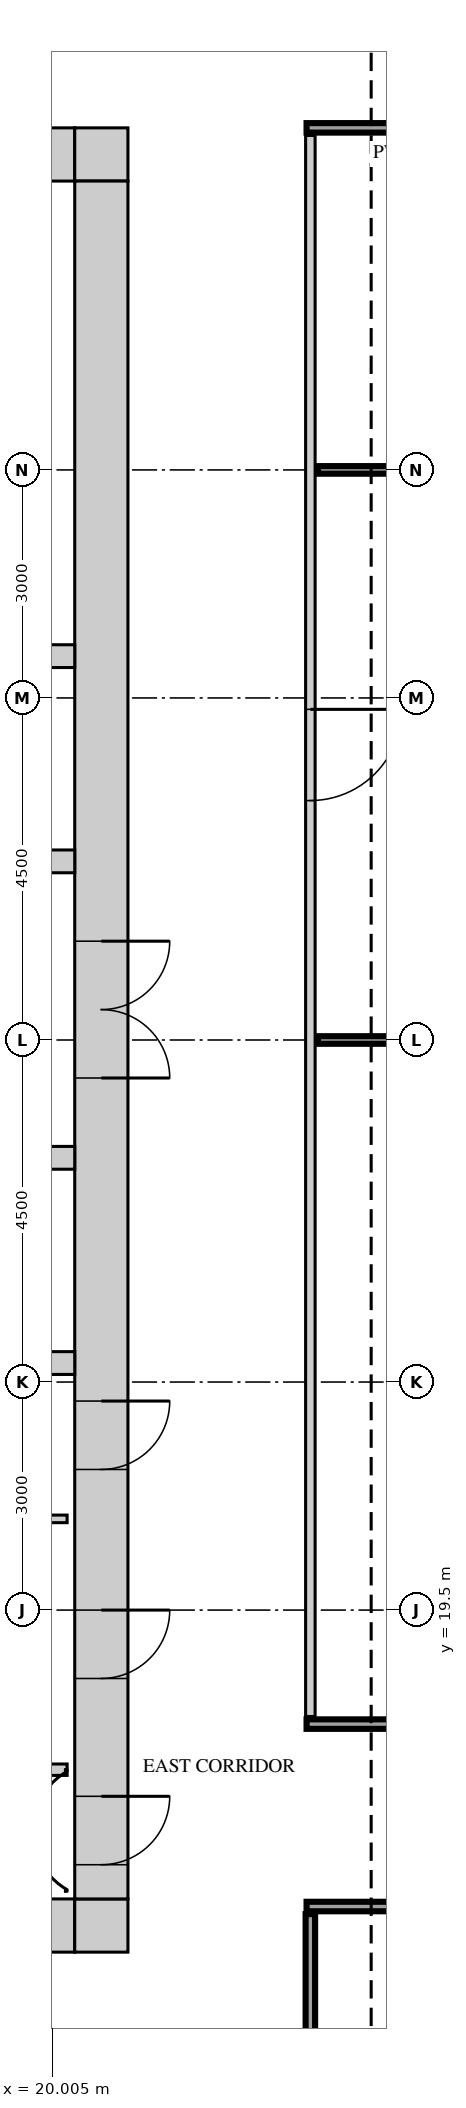
"""IFC4 building model, lengths in metres.
Left out: names, types, materials, properties, quantities, classifications, styles, units other than length and angle.
Written with IfcOpenShell. Run it as: python <this file> out.ifc"""

import sys

from ifc_helpers import new_model, si_unit, direction, frame, frame_2d, origin, place, context, subcontext, project, spatial, rectangle, extrude, source, transform, mapped, element, fill, save


model = new_model("IFC4")
c1 = context("Model", 3, precision=1e-05, world=origin(), true_north=direction((0.0, 1.0)))
c2 = subcontext(c1, "Body", "Model", "MODEL_VIEW")
j1 = project(units=[si_unit("LENGTHUNIT", "METRE"), si_unit("PLANEANGLEUNIT", "RADIAN")], contexts=[c1])
p1 = place(None, origin())
s1 = spatial("IfcSite", under=j1, at=p1, CompositionType="ELEMENT")
p2 = place(p1, origin())
s2 = spatial("IfcBuilding", under=s1, at=p2, CompositionType="ELEMENT")
p3 = place(p2, frame((0.0, 0.0, 254.2)))
s3 = spatial("IfcBuildingStorey", under=s2, at=p3, CompositionType="ELEMENT", Elevation=254.2)
m1 = source(origin(), c2, "Body", "SweptSolid", [
    extrude(rectangle(XDim=13.6, YDim=0.7, at=frame_2d((6.8, 0.0))), origin(), (0.0, 0.0, 1.0), 3.75),
])
p4 = place(p3, frame((6.7, 38.65, 0.0), z_axis=(0.0, 0.0, 1.0), x_axis=(1.0, 0.0, 0.0)))
e1 = element("IfcWall", 1, at=p4, inside=s3, PredefinedType="SHEAR", context=c2, shape_type="MappedRepresentation", body=[
    mapped(m1, transform((0.0, 0.0, 0.0))),
])
m2 = source(origin(), c2, "Body", "SweptSolid", [
    extrude(rectangle(XDim=0.9, YDim=2.1, at=frame_2d((0.45, 1.05))), frame((0.0, 0.36, 0.0), z_axis=(0.0, -1.0, 0.0), x_axis=(1.0, 0.0, 0.0)), (0.0, 0.0, 1.0), 0.72),
])
p5 = place(p4, frame((3.0, 0.0, 0.0)))
e2 = element("IfcOpeningElement", 2, at=p5, cuts=e1, PredefinedType="OPENING", context=c2, shape_type="MappedRepresentation", body=[
    mapped(m2, transform((0.0, 0.0, 0.0))),
])
p6 = place(p4, frame((9.7, 0.0, 0.0)))
e3 = element("IfcOpeningElement", 3, at=p6, cuts=e1, PredefinedType="OPENING", context=c2, shape_type="MappedRepresentation", body=[
    mapped(m2, transform((0.0, 0.0, 0.0))),
])
m3 = source(origin(), c2, "Body", "SweptSolid", [
    extrude(rectangle(XDim=0.7, YDim=0.7, at=frame_2d((0.35, 0.0))), origin(), (0.0, 0.0, 1.0), 3.75),
])
p7 = place(p3, frame((20.3, 38.65, 0.0), z_axis=(0.0, 0.0, 1.0), x_axis=(1.0, 0.0, 0.0)))
e4 = element("IfcWall", 4, at=p7, inside=s3, PredefinedType="SHEAR", context=c2, shape_type="MappedRepresentation", body=[
    mapped(m3, transform((0.0, 0.0, 0.0))),
])
p8 = place(p3, frame((6.7, 15.35, 0.0), z_axis=(0.0, 0.0, 1.0), x_axis=(1.0, 0.0, 0.0)))
e5 = element("IfcWall", 5, at=p8, inside=s3, PredefinedType="SHEAR", context=c2, shape_type="MappedRepresentation", body=[
    mapped(m1, transform((0.0, 0.0, 0.0))),
])
m4 = source(origin(), c2, "Body", "SweptSolid", [
    extrude(rectangle(XDim=1.2, YDim=2.1, at=frame_2d((0.6, 1.05))), frame((0.0, 0.36, 0.0), z_axis=(0.0, -1.0, 0.0), x_axis=(1.0, 0.0, 0.0)), (0.0, 0.0, 1.0), 0.72),
])
p9 = place(p8, frame((5.5, 0.0, 0.0)))
e6 = element("IfcOpeningElement", 6, at=p9, cuts=e5, PredefinedType="OPENING", context=c2, shape_type="MappedRepresentation", body=[
    mapped(m4, transform((0.0, 0.0, 0.0))),
])
p10 = place(p8, frame((2.15, 0.0, 0.0)))
e7 = element("IfcOpeningElement", 7, at=p10, cuts=e5, PredefinedType="OPENING", context=c2, shape_type="MappedRepresentation", body=[
    mapped(m4, transform((0.0, 0.0, 0.0))),
])
m5 = source(origin(), c2, "Body", "SweptSolid", [
    extrude(rectangle(XDim=1.0, YDim=2.1, at=frame_2d((0.5, 1.05))), frame((0.0, 0.36, 0.0), z_axis=(0.0, -1.0, 0.0), x_axis=(1.0, 0.0, 0.0)), (0.0, 0.0, 1.0), 0.72),
])
p11 = place(p8, frame((8.0, 0.0, 0.0)))
e8 = element("IfcOpeningElement", 8, at=p11, cuts=e5, PredefinedType="OPENING", context=c2, shape_type="MappedRepresentation", body=[
    mapped(m5, transform((0.0, 0.0, 0.0))),
])
p12 = place(p3, frame((20.3, 15.35, 0.0), z_axis=(0.0, 0.0, 1.0), x_axis=(1.0, 0.0, 0.0)))
e9 = element("IfcWall", 9, at=p12, inside=s3, PredefinedType="SHEAR", context=c2, shape_type="MappedRepresentation", body=[
    mapped(m3, transform((0.0, 0.0, 0.0))),
])
m6 = source(origin(), c2, "Body", "SweptSolid", [
    extrude(rectangle(XDim=22.6, YDim=0.7, at=frame_2d((11.3, 0.0))), origin(), (0.0, 0.0, 1.0), 3.75),
])
p13 = place(p3, frame((20.65, 15.7, 0.0), z_axis=(0.0, 0.0, 1.0), x_axis=(0.0, 1.0, 0.0)))
e10 = element("IfcWall", 10, at=p13, inside=s3, PredefinedType="SHEAR", context=c2, shape_type="MappedRepresentation", body=[
    mapped(m6, transform((0.0, 0.0, 0.0))),
])
m7 = source(origin(), c2, "Body", "SweptSolid", [
    extrude(rectangle(XDim=1.8, YDim=2.1, at=frame_2d((0.9, 1.05))), frame((0.0, 0.36, 0.0), z_axis=(0.0, -1.0, 0.0), x_axis=(1.0, 0.0, 0.0)), (0.0, 0.0, 1.0), 0.72),
])
p14 = place(p13, frame((10.8, 0.0, 0.0)))
e11 = element("IfcOpeningElement", 11, at=p14, cuts=e10, PredefinedType="OPENING", context=c2, shape_type="MappedRepresentation", body=[
    mapped(m7, transform((0.0, 0.0, 0.0))),
])
p15 = place(p13, frame((0.45, 0.0, 0.0)))
e12 = element("IfcOpeningElement", 12, at=p15, cuts=e10, PredefinedType="OPENING", context=c2, shape_type="MappedRepresentation", body=[
    mapped(m2, transform((0.0, 0.0, 0.0))),
])
p16 = place(p13, frame((2.9, 0.0, 0.0)))
e13 = element("IfcOpeningElement", 13, at=p16, cuts=e10, PredefinedType="OPENING", context=c2, shape_type="MappedRepresentation", body=[
    mapped(m2, transform((0.0, 0.0, 0.0))),
])
p17 = place(p13, frame((5.65, 0.0, 0.0)))
e14 = element("IfcOpeningElement", 14, at=p17, cuts=e10, PredefinedType="OPENING", context=c2, shape_type="MappedRepresentation", body=[
    mapped(m2, transform((0.0, 0.0, 0.0))),
])
m8 = source(origin(), c2, "Body", "SweptSolid", [
    extrude(rectangle(XDim=13.6, YDim=0.3, at=frame_2d((6.8, 0.0))), origin(), (0.0, 0.0, 1.0), 3.75),
])
for number, where, z_axis, x_axis in (
    (15, (6.7, 22.75, 0.0), (0.0, 0.0, 1.0), (1.0, 0.0, 0.0)),
    (16, (6.7, 32.05, 0.0), (0.0, 0.0, 1.0), (1.0, 0.0, 0.0)),
):
    element("IfcWall", number, at=place(p3, frame(where, z_axis=z_axis, x_axis=x_axis)), inside=s3, PredefinedType="STANDARD", context=c2, shape_type="MappedRepresentation", body=[
        mapped(m8, transform((0.0, 0.0, 0.0))),
    ])
p18 = place(p3, frame((6.7, 29.35, 0.0), z_axis=(0.0, 0.0, 1.0), x_axis=(1.0, 0.0, 0.0)))
e17 = element("IfcWall", 17, at=p18, inside=s3, PredefinedType="STANDARD", context=c2, shape_type="MappedRepresentation", body=[
    mapped(m8, transform((0.0, 0.0, 0.0))),
])
m9 = source(origin(), c2, "Body", "SweptSolid", [
    extrude(rectangle(XDim=1.2, YDim=2.1, at=frame_2d((0.6, 1.05))), frame((0.0, 0.16, 0.0), z_axis=(0.0, -1.0, 0.0), x_axis=(1.0, 0.0, 0.0)), (0.0, 0.0, 1.0), 0.32),
])
p19 = place(p18, frame((1.05, 0.0, 0.0)))
e18 = element("IfcOpeningElement", 18, at=p19, cuts=e17, PredefinedType="OPENING", context=c2, shape_type="MappedRepresentation", body=[
    mapped(m9, transform((0.0, 0.0, 0.0))),
])
p20 = place(p18, frame((3.6, 0.0, 0.0)))
e19 = element("IfcOpeningElement", 19, at=p20, cuts=e17, PredefinedType="OPENING", context=c2, shape_type="MappedRepresentation", body=[
    mapped(m9, transform((0.0, 0.0, 0.0))),
])
p21 = place(p18, frame((6.15, 0.0, 0.0)))
e20 = element("IfcOpeningElement", 20, at=p21, cuts=e17, PredefinedType="OPENING", context=c2, shape_type="MappedRepresentation", body=[
    mapped(m9, transform((0.0, 0.0, 0.0))),
])
p22 = place(p18, frame((8.7, 0.0, 0.0)))
e21 = element("IfcOpeningElement", 21, at=p22, cuts=e17, PredefinedType="OPENING", context=c2, shape_type="MappedRepresentation", body=[
    mapped(m9, transform((0.0, 0.0, 0.0))),
])
p23 = place(p18, frame((11.25, 0.0, 0.0)))
e22 = element("IfcOpeningElement", 22, at=p23, cuts=e17, PredefinedType="OPENING", context=c2, shape_type="MappedRepresentation", body=[
    mapped(m9, transform((0.0, 0.0, 0.0))),
])
p24 = place(p3, frame((6.7, 25.45, 0.0), z_axis=(0.0, 0.0, 1.0), x_axis=(1.0, 0.0, 0.0)))
e23 = element("IfcWall", 23, at=p24, inside=s3, PredefinedType="STANDARD", context=c2, shape_type="MappedRepresentation", body=[
    mapped(m8, transform((0.0, 0.0, 0.0))),
])
p25 = place(p24, frame((1.05, 0.0, 0.0)))
e24 = element("IfcOpeningElement", 24, at=p25, cuts=e23, PredefinedType="OPENING", context=c2, shape_type="MappedRepresentation", body=[
    mapped(m9, transform((0.0, 0.0, 0.0))),
])
p26 = place(p24, frame((3.6, 0.0, 0.0)))
e25 = element("IfcOpeningElement", 25, at=p26, cuts=e23, PredefinedType="OPENING", context=c2, shape_type="MappedRepresentation", body=[
    mapped(m9, transform((0.0, 0.0, 0.0))),
])
p27 = place(p24, frame((6.15, 0.0, 0.0)))
e26 = element("IfcOpeningElement", 26, at=p27, cuts=e23, PredefinedType="OPENING", context=c2, shape_type="MappedRepresentation", body=[
    mapped(m9, transform((0.0, 0.0, 0.0))),
])
p28 = place(p24, frame((8.7, 0.0, 0.0)))
e27 = element("IfcOpeningElement", 27, at=p28, cuts=e23, PredefinedType="OPENING", context=c2, shape_type="MappedRepresentation", body=[
    mapped(m9, transform((0.0, 0.0, 0.0))),
])
p29 = place(p24, frame((11.25, 0.0, 0.0)))
e28 = element("IfcOpeningElement", 28, at=p29, cuts=e23, PredefinedType="OPENING", context=c2, shape_type="MappedRepresentation", body=[
    mapped(m9, transform((0.0, 0.0, 0.0))),
])
m10 = source(origin(), c2, "Body", "SweptSolid", [
    extrude(rectangle(XDim=10.85, YDim=0.125, at=frame_2d((5.425, 0.0))), origin(), (0.0, 0.0, 1.0), 3.8),
])
p30 = place(p3, frame((23.4, 4.65, 0.0), z_axis=(0.0, 0.0, 1.0), x_axis=(0.0, 1.0, 0.0)))
e29 = element("IfcWall", 29, at=p30, inside=s3, PredefinedType="PARTITIONING", context=c2, shape_type="MappedRepresentation", body=[
    mapped(m10, transform((0.0, 0.0, 0.0))),
])
m11 = source(origin(), c2, "Body", "SweptSolid", [
    extrude(rectangle(XDim=0.9, YDim=2.1, at=frame_2d((0.45, 1.05))), frame((0.0, 0.073, 0.0), z_axis=(0.0, -1.0, 0.0), x_axis=(1.0, 0.0, 0.0)), (0.0, 0.0, 1.0), 0.145),
])
p31 = place(p30, frame((4.5, 0.0, 0.0)))
e30 = element("IfcOpeningElement", 30, at=p31, cuts=e29, PredefinedType="OPENING", context=c2, shape_type="MappedRepresentation", body=[
    mapped(m11, transform((0.0, 0.0, 0.0))),
])
m12 = source(origin(), c2, "Body", "SweptSolid", [
    extrude(rectangle(XDim=26.0, YDim=0.125, at=frame_2d((13.0, 0.0))), origin(), (0.0, 0.0, 1.0), 3.8),
])
p32 = place(p3, frame((23.35, 15.6, 0.0), z_axis=(0.0, 0.0, 1.0), x_axis=(1.0, 0.0, 0.0)))
e31 = element("IfcWall", 31, at=p32, inside=s3, PredefinedType="PARTITIONING", context=c2, shape_type="MappedRepresentation", body=[
    mapped(m12, transform((0.0, 0.0, 0.0))),
])
p33 = place(p32, frame((4.05, 0.0, 0.0)))
e32 = element("IfcOpeningElement", 32, at=p33, cuts=e31, PredefinedType="OPENING", context=c2, shape_type="MappedRepresentation", body=[
    mapped(m11, transform((0.0, 0.0, 0.0))),
])
m13 = source(origin(), c2, "Body", "SweptSolid", [
    extrude(rectangle(XDim=1.0, YDim=2.1, at=frame_2d((0.5, 1.05))), frame((0.0, 0.073, 0.0), z_axis=(0.0, -1.0, 0.0), x_axis=(1.0, 0.0, 0.0)), (0.0, 0.0, 1.0), 0.145),
])
p34 = place(p32, frame((6.85, 0.0, 0.0)))
e33 = element("IfcOpeningElement", 33, at=p34, cuts=e31, PredefinedType="OPENING", context=c2, shape_type="MappedRepresentation", body=[
    mapped(m13, transform((0.0, 0.0, 0.0))),
])
p35 = place(p32, frame((9.25, 0.0, 0.0)))
e34 = element("IfcOpeningElement", 34, at=p35, cuts=e31, PredefinedType="OPENING", context=c2, shape_type="MappedRepresentation", body=[
    mapped(m11, transform((0.0, 0.0, 0.0))),
])
m14 = source(origin(), c2, "Body", "SweptSolid", [
    extrude(rectangle(XDim=1.2, YDim=2.1, at=frame_2d((0.6, 1.05))), frame((0.0, 0.073, 0.0), z_axis=(0.0, -1.0, 0.0), x_axis=(1.0, 0.0, 0.0)), (0.0, 0.0, 1.0), 0.145),
])
p36 = place(p32, frame((18.05, 0.0, 0.0)))
e35 = element("IfcOpeningElement", 35, at=p36, cuts=e31, PredefinedType="OPENING", context=c2, shape_type="MappedRepresentation", body=[
    mapped(m14, transform((0.0, 0.0, 0.0))),
])
m15 = source(origin(), c2, "Body", "SweptSolid", [
    extrude(rectangle(XDim=4.0, YDim=0.15, at=frame_2d((2.0, 0.0))), origin(), (0.0, 0.0, 1.0), 3.8),
])
p37 = place(p3, frame((16.2, 17.4, 0.0), z_axis=(0.0, 0.0, 1.0), x_axis=(1.0, 0.0, 0.0)))
e36 = element("IfcWall", 36, at=p37, inside=s3, PredefinedType="PARTITIONING", context=c2, shape_type="MappedRepresentation", body=[
    mapped(m15, transform((0.0, 0.0, 0.0))),
])
p38 = place(p3, frame((23.35, 18.0, 0.0), z_axis=(0.0, 0.0, 1.0), x_axis=(1.0, 0.0, 0.0)))
e37 = element("IfcWall", 37, at=p38, inside=s3, PredefinedType="PARTITIONING", context=c2, shape_type="MappedRepresentation", body=[
    mapped(m12, transform((0.0, 0.0, 0.0))),
])
p39 = place(p38, frame((12.5, 0.0, 0.0)))
e38 = element("IfcOpeningElement", 38, at=p39, cuts=e37, PredefinedType="OPENING", context=c2, shape_type="MappedRepresentation", body=[
    mapped(m14, transform((0.0, 0.0, 0.0))),
])
m16 = source(origin(), c2, "Body", "SweptSolid", [
    extrude(rectangle(XDim=20.8, YDim=0.125, at=frame_2d((10.4, 0.0))), origin(), (0.0, 0.0, 1.0), 3.8),
])
p40 = place(p3, frame((23.4, 18.1, 0.0), z_axis=(0.0, 0.0, 1.0), x_axis=(0.0, 1.0, 0.0)))
e39 = element("IfcWall", 39, at=p40, inside=s3, PredefinedType="PARTITIONING", context=c2, shape_type="MappedRepresentation", body=[
    mapped(m16, transform((0.0, 0.0, 0.0))),
])
p41 = place(p40, frame((12.05, 0.0, 0.0)))
e40 = element("IfcOpeningElement", 40, at=p41, cuts=e39, PredefinedType="OPENING", context=c2, shape_type="MappedRepresentation", body=[
    mapped(m14, transform((0.0, 0.0, 0.0))),
])
m17 = source(origin(), c2, "Body", "SweptSolid", [
    extrude(rectangle(XDim=4.1, YDim=0.1, at=frame_2d((2.05, 0.0))), origin(), (0.0, 0.0, 1.0), 3.8),
])
p42 = place(p3, frame((16.1, 20.7, 0.0), z_axis=(0.0, 0.0, 1.0), x_axis=(1.0, 0.0, 0.0)))
e41 = element("IfcWall", 41, at=p42, inside=s3, PredefinedType="PARTITIONING", context=c2, shape_type="MappedRepresentation", body=[
    mapped(m17, transform((0.0, 0.0, 0.0))),
])
m18 = source(origin(), c2, "Body", "SweptSolid", [
    extrude(rectangle(XDim=25.85, YDim=0.1, at=frame_2d((12.925, 0.0))), origin(), (0.0, 0.0, 1.0), 3.8),
])
for number, where, z_axis, x_axis in (
    (42, (23.5, 27.0, 0.0), (0.0, 0.0, 1.0), (1.0, 0.0, 0.0)),
    (43, (23.5, 34.5, 0.0), (0.0, 0.0, 1.0), (1.0, 0.0, 0.0)),
):
    element("IfcWall", number, at=place(p3, frame(where, z_axis=z_axis, x_axis=x_axis)), inside=s3, PredefinedType="PARTITIONING", context=c2, shape_type="MappedRepresentation", body=[
        mapped(m18, transform((0.0, 0.0, 0.0))),
    ])
m19 = source(origin(), c2, "Body", "SweptSolid", [
    extrude(rectangle(XDim=7.1, YDim=0.125, at=frame_2d((3.55, 0.0))), origin(), (0.0, 0.0, 1.0), 3.8),
])
p43 = place(p3, frame((23.35, 39.0, 0.0), z_axis=(0.0, 0.0, 1.0), x_axis=(1.0, 0.0, 0.0)))
e44 = element("IfcWall", 44, at=p43, inside=s3, PredefinedType="PARTITIONING", context=c2, shape_type="MappedRepresentation", body=[
    mapped(m19, transform((0.0, 0.0, 0.0))),
])
p44 = place(p43, frame((2.95, 0.0, 0.0)))
e45 = element("IfcOpeningElement", 45, at=p44, cuts=e44, PredefinedType="OPENING", context=c2, shape_type="MappedRepresentation", body=[
    mapped(m14, transform((0.0, 0.0, 0.0))),
])
m20 = source(origin(), c2, "Body", "SweptSolid", [
    extrude(rectangle(XDim=1.8, YDim=2.1, at=frame_2d((0.9, 1.05))), frame((0.0, 0.3, 0.0), z_axis=(0.0, -1.0, 0.0), x_axis=(1.0, 0.0, 0.0)), (0.0, 0.0, 1.0), 0.6),
])
p45 = place(p14, origin())
e46 = element("IfcDoor", 46, at=p45, inside=s3, OperationType="DOUBLE_DOOR_SINGLE_SWING", PredefinedType="DOOR", context=c2, shape_type="MappedRepresentation", body=[
    mapped(m20, transform((0.0, 0.0, 0.0))),
])
fill(e11, e46)
m21 = source(origin(), c2, "Body", "SweptSolid", [
    extrude(rectangle(XDim=0.9, YDim=2.1, at=frame_2d((0.45, 1.05))), frame((0.0, 0.3, 0.0), z_axis=(0.0, -1.0, 0.0), x_axis=(1.0, 0.0, 0.0)), (0.0, 0.0, 1.0), 0.6),
])
p46 = place(p15, origin())
e47 = element("IfcDoor", 47, at=p46, inside=s3, OperationType="SINGLE_SWING_RIGHT", PredefinedType="DOOR", context=c2, shape_type="MappedRepresentation", body=[
    mapped(m21, transform((0.0, 0.0, 0.0))),
])
fill(e12, e47)
p47 = place(p16, origin())
e48 = element("IfcDoor", 48, at=p47, inside=s3, OperationType="SINGLE_SWING_RIGHT", PredefinedType="DOOR", context=c2, shape_type="MappedRepresentation", body=[
    mapped(m21, transform((0.0, 0.0, 0.0))),
])
fill(e13, e48)
p48 = place(p17, origin())
e49 = element("IfcDoor", 49, at=p48, inside=s3, OperationType="SINGLE_SWING_RIGHT", PredefinedType="DOOR", context=c2, shape_type="MappedRepresentation", body=[
    mapped(m21, transform((0.0, 0.0, 0.0))),
])
fill(e14, e49)
m22 = source(origin(), c2, "Body", "SweptSolid", [
    extrude(rectangle(XDim=1.2, YDim=2.1, at=frame_2d((0.6, 1.05))), frame((0.0, 0.025, 0.0), z_axis=(0.0, -1.0, 0.0), x_axis=(1.0, 0.0, 0.0)), (0.0, 0.0, 1.0), 0.05),
])
p49 = place(p41, origin())
e50 = element("IfcDoor", 50, at=p49, inside=s3, OperationType="SINGLE_SWING_RIGHT", PredefinedType="DOOR", context=c2, shape_type="MappedRepresentation", body=[
    mapped(m22, transform((0.0, 0.0, 0.0))),
])
fill(e40, e50)
save(model, sys.argv[1])
